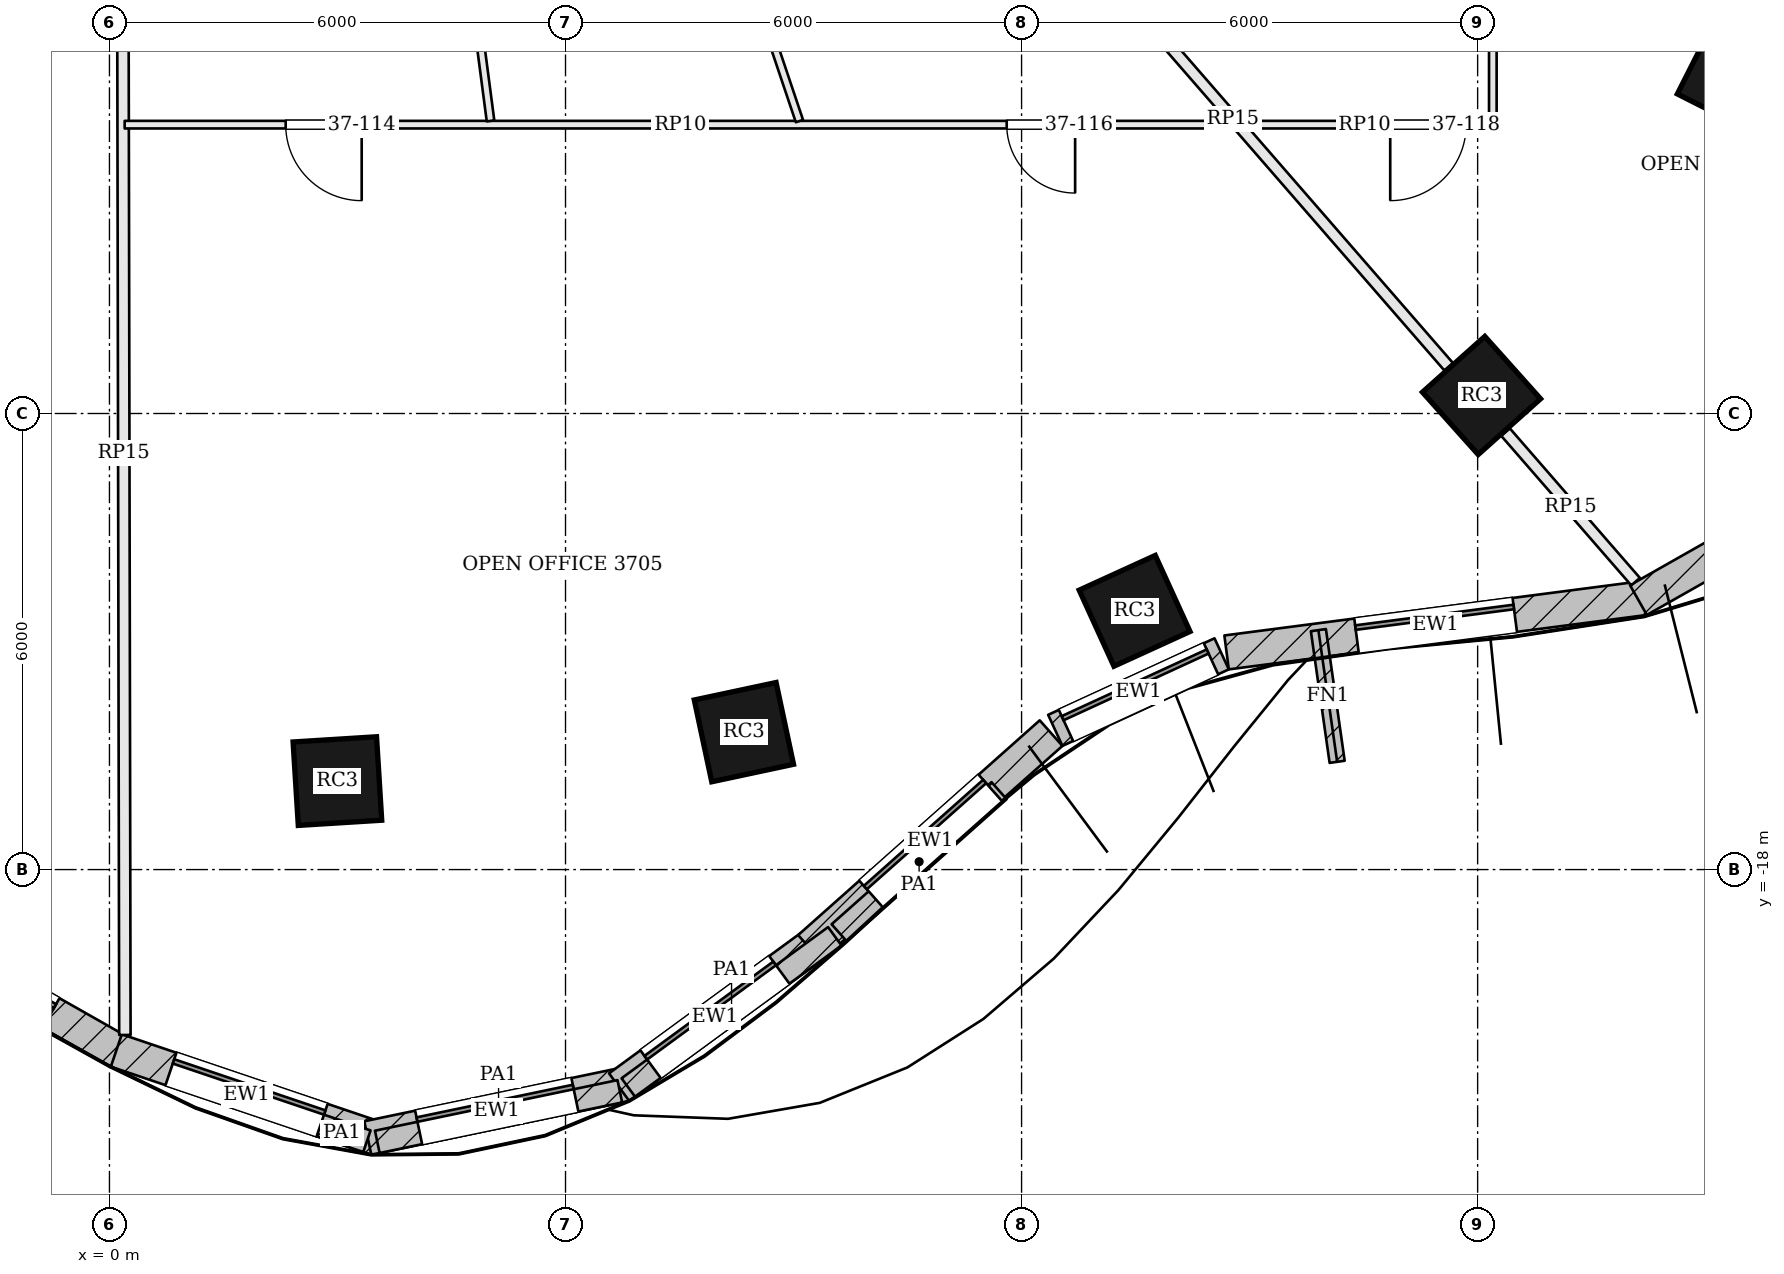
"""IFC4 building model, lengths in metres.
Left out: names, types, materials, properties, quantities, classifications, styles, units other than length and angle.
Written with IfcOpenShell. Run it as: python <this file> out.ifc"""

import sys

from ifc_helpers import new_model, si_unit, direction, frame, frame_2d, origin, origin_2d, place, context, subcontext, project, spatial, rectangle, extrude, element, fill, save


model = new_model("IFC4")
c1 = context("Model", 3, precision=1e-05, world=origin(), true_north=direction((0.0, 1.0)))
c2 = subcontext(c1, "Body", "Model", "MODEL_VIEW")
j1 = project(units=[si_unit("LENGTHUNIT", "METRE"), si_unit("PLANEANGLEUNIT", "RADIAN")], contexts=[c1])
p1 = place(None, origin())
s1 = spatial("IfcSite", under=j1, at=p1, CompositionType="ELEMENT")
p2 = place(p1, origin())
s2 = spatial("IfcBuilding", under=s1, at=p2, CompositionType="ELEMENT")
p3 = place(p2, frame((0.0, 0.0, 153.9)))
s3 = spatial("IfcBuildingStorey", under=s2, at=p3, CompositionType="ELEMENT", Elevation=153.9)
for number, where, z_axis, x_axis in (
    (1, (2.999, -16.836, 0.0), (0.0, 0.0, 1.0), (0.998, 0.062, 0.0)),
    (2, (8.347, -16.192, 0.0), (0.0, 0.0, 1.0), (0.978, 0.209, 0.0)),
    (3, (13.487, -14.596, 0.0), (0.0, 0.0, 1.0), (0.91, 0.415, 0.0)),
    (4, (18.051, -11.763, 0.0), (0.0, 0.0, 1.0), (0.746, 0.666, 0.0)),
    (5, (21.367, -7.554, 0.0), (0.0, 0.0, 1.0), (0.452, 0.892, 0.0)),
):
    element("IfcColumn", number, at=place(p3, frame(where, z_axis=z_axis, x_axis=x_axis)), inside=s3, PredefinedType="COLUMN", context=c2, shape_type="SweptSolid", body=[
        extrude(rectangle(XDim=1.1, YDim=1.1, at=origin_2d()), origin(), (0.0, 0.0, 1.0), 3.9),
    ])
p4 = place(p3, frame((-3.493, -18.343, 0.0), z_axis=(0.0, 0.0, 1.0), x_axis=(0.869825988853, -0.493358641473, 0.0)))
e6 = element("IfcWall", 6, at=p4, inside=s3, PredefinedType="SOLIDWALL", context=c2, shape_type="SweptSolid", body=[
    extrude(rectangle(XDim=4.165, YDim=0.45, at=frame_2d((2.083, 0.0))), origin(), (0.0, 0.0, 1.0), 3.7),
])
p5 = place(p4, frame((1.032, 0.0, 0.9)))
e7 = element("IfcOpeningElement", 7, at=p5, cuts=e6, PredefinedType="OPENING", context=c2, shape_type="SweptSolid", body=[
    extrude(rectangle(XDim=2.1, YDim=2.3, at=frame_2d((1.05, 1.15))), frame((0.0, 0.235, 0.0), z_axis=(0.0, -1.0, 0.0), x_axis=(1.0, 0.0, 0.0)), (0.0, 0.0, 1.0), 0.47),
])
p6 = place(p3, frame((0.091, -20.38, 0.0), z_axis=(0.0, 0.0, 1.0), x_axis=(0.947304227221, -0.320335294791, 0.0)))
e8 = element("IfcWall", 8, at=p6, inside=s3, PredefinedType="SOLIDWALL", context=c2, shape_type="SweptSolid", body=[
    extrude(rectangle(XDim=3.617, YDim=0.45, at=frame_2d((1.809, 0.0))), origin(), (0.0, 0.0, 1.0), 3.7),
])
p7 = place(p6, frame((0.759, 0.0, 0.9)))
e9 = element("IfcOpeningElement", 9, at=p7, cuts=e8, PredefinedType="OPENING", context=c2, shape_type="SweptSolid", body=[
    extrude(rectangle(XDim=2.1, YDim=2.3, at=frame_2d((1.05, 1.15))), frame((0.0, 0.235, 0.0), z_axis=(0.0, -1.0, 0.0), x_axis=(1.0, 0.0, 0.0)), (0.0, 0.0, 1.0), 0.47),
])
p8 = place(p3, frame((3.399, -21.532, 0.0), z_axis=(0.0, 0.0, 1.0), x_axis=(0.978915912181, 0.204263645512, 0.0)))
e10 = element("IfcWall", 10, at=p8, inside=s3, PredefinedType="SOLIDWALL", context=c2, shape_type="SweptSolid", body=[
    extrude(rectangle(XDim=3.466, YDim=0.45, at=frame_2d((1.733, 0.0))), origin(), (0.0, 0.0, 1.0), 3.7),
])
p9 = place(p8, frame((0.683, 0.0, 0.9)))
e11 = element("IfcOpeningElement", 11, at=p9, cuts=e10, PredefinedType="OPENING", context=c2, shape_type="SweptSolid", body=[
    extrude(rectangle(XDim=2.1, YDim=2.3, at=frame_2d((1.05, 1.15))), frame((0.0, 0.235, 0.0), z_axis=(0.0, -1.0, 0.0), x_axis=(1.0, 0.0, 0.0)), (0.0, 0.0, 1.0), 0.47),
])
p10 = place(p3, frame((6.705, -20.862, 0.0), z_axis=(0.0, 0.0, 1.0), x_axis=(0.806921336267, 0.590658917716, 0.0)))
e12 = element("IfcWall", 12, at=p10, inside=s3, PredefinedType="SOLIDWALL", context=c2, shape_type="SweptSolid", body=[
    extrude(rectangle(XDim=3.125, YDim=0.45, at=frame_2d((1.562, 0.0))), origin(), (0.0, 0.0, 1.0), 3.7),
])
p11 = place(p10, frame((0.512, 0.0, 0.9)))
e13 = element("IfcOpeningElement", 13, at=p11, cuts=e12, PredefinedType="OPENING", context=c2, shape_type="SweptSolid", body=[
    extrude(rectangle(XDim=2.1, YDim=2.3, at=frame_2d((1.05, 1.15))), frame((0.0, 0.235, 0.0), z_axis=(0.0, -1.0, 0.0), x_axis=(1.0, 0.0, 0.0)), (0.0, 0.0, 1.0), 0.47),
])
p12 = place(p3, frame((9.21, -19.03, 0.0), z_axis=(0.0, 0.0, 1.0), x_axis=(0.747396648191, 0.664378092861, 0.0)))
e14 = element("IfcWall", 14, at=p12, inside=s3, PredefinedType="SOLIDWALL", context=c2, shape_type="SweptSolid", body=[
    extrude(rectangle(XDim=4.252, YDim=0.45, at=frame_2d((2.126, 0.0))), origin(), (0.0, 0.0, 1.0), 3.7),
])
p13 = place(p12, frame((1.076, 0.0, 0.9)))
e15 = element("IfcOpeningElement", 15, at=p13, cuts=e14, PredefinedType="OPENING", context=c2, shape_type="SweptSolid", body=[
    extrude(rectangle(XDim=2.1, YDim=2.3, at=frame_2d((1.05, 1.15))), frame((0.0, 0.235, 0.0), z_axis=(0.0, -1.0, 0.0), x_axis=(1.0, 0.0, 0.0)), (0.0, 0.0, 1.0), 0.47),
])
p14 = place(p3, frame((12.444, -16.169, 0.0), z_axis=(0.0, 0.0, 1.0), x_axis=(0.908468904074, 0.417952449844, 0.0)))
e16 = element("IfcWall", 16, at=p14, inside=s3, PredefinedType="SOLIDWALL", context=c2, shape_type="SweptSolid", body=[
    extrude(rectangle(XDim=2.409, YDim=0.45, at=frame_2d((1.205, 0.0))), origin(), (0.0, 0.0, 1.0), 3.7),
])
p15 = place(p14, frame((0.155, 0.0, 0.9)))
e17 = element("IfcOpeningElement", 17, at=p15, cuts=e16, PredefinedType="OPENING", context=c2, shape_type="SweptSolid", body=[
    extrude(rectangle(XDim=2.1, YDim=2.3, at=frame_2d((1.05, 1.15))), frame((0.0, 0.235, 0.0), z_axis=(0.0, -1.0, 0.0), x_axis=(1.0, 0.0, 0.0)), (0.0, 0.0, 1.0), 0.47),
])
p16 = place(p3, frame((14.697, -15.143, 0.0), z_axis=(0.0, 0.0, 1.0), x_axis=(0.991631798411, 0.129098320597, 0.0)))
e18 = element("IfcWall", 18, at=p16, inside=s3, PredefinedType="SOLIDWALL", context=c2, shape_type="SweptSolid", body=[
    extrude(rectangle(XDim=5.547, YDim=0.45, at=frame_2d((2.773, 0.0))), origin(), (0.0, 0.0, 1.0), 3.7),
])
p17 = place(p16, frame((1.723, 0.0, 0.9)))
e19 = element("IfcOpeningElement", 19, at=p17, cuts=e18, PredefinedType="OPENING", context=c2, shape_type="SweptSolid", body=[
    extrude(rectangle(XDim=2.1, YDim=2.3, at=frame_2d((1.05, 1.15))), frame((0.0, 0.235, 0.0), z_axis=(0.0, -1.0, 0.0), x_axis=(1.0, 0.0, 0.0)), (0.0, 0.0, 1.0), 0.47),
])
p18 = place(p3, frame((20.115, -14.455, 0.0), z_axis=(0.0, 0.0, 1.0), x_axis=(0.869822679286, 0.493364476427, 0.0)))
e20 = element("IfcWall", 20, at=p18, inside=s3, PredefinedType="SOLIDWALL", context=c2, shape_type="SweptSolid", body=[
    extrude(rectangle(XDim=4.638, YDim=0.45, at=frame_2d((2.319, 0.0))), origin(), (0.0, 0.0, 1.0), 3.7),
])
p19 = place(p18, frame((1.269, 0.0, 0.9)))
e21 = element("IfcOpeningElement", 21, at=p19, cuts=e20, PredefinedType="OPENING", context=c2, shape_type="SweptSolid", body=[
    extrude(rectangle(XDim=2.1, YDim=2.3, at=frame_2d((1.05, 1.15))), frame((0.0, 0.235, 0.0), z_axis=(0.0, -1.0, 0.0), x_axis=(1.0, 0.0, 0.0)), (0.0, 0.0, 1.0), 0.47),
])
p20 = place(p3, frame((15.905, -14.85, 0.0), z_axis=(0.0, 0.0, 1.0), x_axis=(0.140913490987, -0.990021912918, 0.0)))
e22 = element("IfcWall", 22, at=p20, inside=s3, PredefinedType="SOLIDWALL", context=c2, shape_type="SweptSolid", body=[
    extrude(rectangle(XDim=1.75, YDim=0.2, at=frame_2d((0.875, 0.0))), origin(), (0.0, 0.0, 1.0), 3.7),
])
p21 = place(p3, frame((2.729, -21.352, 3.9), z_axis=(0.0, 0.0, 1.0), x_axis=(0.947268485621, -0.320440971397, 0.0)))
e23 = element("IfcWall", 23, at=p21, inside=s3, PredefinedType="PARAPET", context=c2, shape_type="SweptSolid", body=[
    extrude(rectangle(XDim=0.695, YDim=0.3, at=frame_2d((0.347, 0.0))), origin(), (0.0, 0.0, 1.0), 1.1),
])
p22 = place(p3, frame((3.524, -21.582, 3.9), z_axis=(0.0, 0.0, 1.0), x_axis=(0.97891618591, 0.204262333689, 0.0)))
e24 = element("IfcWall", 24, at=p22, inside=s3, PredefinedType="PARAPET", context=c2, shape_type="SweptSolid", body=[
    extrude(rectangle(XDim=3.259, YDim=0.3, at=frame_2d((1.63, 0.0))), origin(), (0.0, 0.0, 1.0), 1.1),
])
p23 = place(p3, frame((6.826, -20.867, 3.9), z_axis=(0.0, 0.0, 1.0), x_axis=(0.806907255022, 0.590678154152, 0.0)))
e25 = element("IfcWall", 25, at=p23, inside=s3, PredefinedType="PARAPET", context=c2, shape_type="SweptSolid", body=[
    extrude(rectangle(XDim=3.367, YDim=0.3, at=frame_2d((1.684, 0.0))), origin(), (0.0, 0.0, 1.0), 1.1),
])
p24 = place(p3, frame((9.6, -18.832, 3.9), z_axis=(0.0, 0.0, 1.0), x_axis=(0.747433246304, 0.664336919281, 0.0)))
e26 = element("IfcWall", 26, at=p24, inside=s3, PredefinedType="PARAPET", context=c2, shape_type="SweptSolid", body=[
    extrude(rectangle(XDim=2.815, YDim=0.3, at=frame_2d((1.407, 0.0))), origin(), (0.0, 0.0, 1.0), 1.1),
])
p25 = place(p3, frame((0.203, -20.176, 0.0), z_axis=(0.0, 0.0, 1.0), x_axis=(-0.001930652346, 0.999998136289, 0.0)))
e27 = element("IfcWall", 27, at=p25, inside=s3, PredefinedType="PARTITIONING", context=c2, shape_type="SweptSolid", body=[
    extrude(rectangle(XDim=15.301, YDim=0.15, at=frame_2d((7.65, 0.0))), origin(), (0.0, 0.0, 1.0), 3.198),
])
p26 = place(p3, frame((20.078, -14.212, 0.0), z_axis=(0.0, 0.0, 1.0), x_axis=(-0.656227405116, 0.754563180108, 0.0)))
e28 = element("IfcWall", 28, at=p26, inside=s3, PredefinedType="PARTITIONING", context=c2, shape_type="SweptSolid", body=[
    extrude(rectangle(XDim=2.607, YDim=0.15, at=frame_2d((1.303, 0.0))), origin(), (0.0, 0.0, 1.0), 3.198),
])
p27 = place(p3, frame((17.619, -11.385, 0.0), z_axis=(0.0, 0.0, 1.0), x_axis=(-0.656270229344, 0.754525934662, 0.0)))
e29 = element("IfcWall", 29, at=p27, inside=s3, PredefinedType="PARTITIONING", context=c2, shape_type="SweptSolid", body=[
    extrude(rectangle(XDim=8.652, YDim=0.15, at=frame_2d((4.326, 0.0))), origin(), (0.0, 0.0, 1.0), 3.198),
])
p28 = place(p3, frame((14.823, -8.2, 0.0), z_axis=(0.0, 0.0, 1.0), x_axis=(-1.0, 0.0, 0.0)))
e30 = element("IfcWall", 30, at=p28, inside=s3, PredefinedType="PARTITIONING", context=c2, shape_type="SweptSolid", body=[
    extrude(rectangle(XDim=14.622, YDim=0.1, at=frame_2d((7.311, 0.0))), origin(), (0.0, 0.0, 1.0), 3.184),
])
p29 = place(p28, frame((11.504, 0.0, 0.0)))
e31 = element("IfcOpeningElement", 31, at=p29, cuts=e30, PredefinedType="OPENING", context=c2, shape_type="SweptSolid", body=[
    extrude(rectangle(XDim=1.0, YDim=2.1, at=frame_2d((0.5, 1.05))), frame((0.0, 0.06, 0.0), z_axis=(0.0, -1.0, 0.0), x_axis=(1.0, 0.0, 0.0)), (0.0, 0.0, 1.0), 0.12),
])
p30 = place(p28, frame((2.118, 0.0, 0.0)))
e32 = element("IfcOpeningElement", 32, at=p30, cuts=e30, PredefinedType="OPENING", context=c2, shape_type="SweptSolid", body=[
    extrude(rectangle(XDim=0.9, YDim=2.1, at=frame_2d((0.45, 1.05))), frame((0.0, 0.06, 0.0), z_axis=(0.0, -1.0, 0.0), x_axis=(1.0, 0.0, 0.0)), (0.0, 0.0, 1.0), 0.12),
])
p31 = place(p3, frame((4.583, -4.875, 0.0), z_axis=(0.0, 0.0, 1.0), x_axis=(0.130125733959, -0.991497500431, 0.0)))
e33 = element("IfcWall", 33, at=p31, inside=s3, PredefinedType="PARTITIONING", context=c2, shape_type="SweptSolid", body=[
    extrude(rectangle(XDim=3.304, YDim=0.1, at=frame_2d((1.652, 0.0))), origin(), (0.0, 0.0, 1.0), 3.184),
])
p32 = place(p3, frame((7.974, -4.871, 0.0), z_axis=(0.0, 0.0, 1.0), x_axis=(0.318807519281, -0.947819479463, 0.0)))
e34 = element("IfcWall", 34, at=p32, inside=s3, PredefinedType="PARTITIONING", context=c2, shape_type="SweptSolid", body=[
    extrude(rectangle(XDim=3.462, YDim=0.1, at=frame_2d((1.731, 0.0))), origin(), (0.0, 0.0, 1.0), 3.184),
])
p33 = place(p3, frame((18.2, 2.915, 0.0), z_axis=(0.0, 0.0, 1.0), x_axis=(0.0, -1.0, 0.0)))
e35 = element("IfcWall", 35, at=p33, inside=s3, PredefinedType="PARTITIONING", context=c2, shape_type="SweptSolid", body=[
    extrude(rectangle(XDim=11.115, YDim=0.1, at=frame_2d((5.558, 0.0))), origin(), (0.0, 0.0, 1.0), 3.184),
])
p34 = place(p33, frame((1.017, 0.0, 0.0)))
e36 = element("IfcOpeningElement", 36, at=p34, cuts=e35, PredefinedType="OPENING", context=c2, shape_type="SweptSolid", body=[
    extrude(rectangle(XDim=0.9, YDim=2.1, at=frame_2d((0.45, 1.05))), frame((0.0, 0.06, 0.0), z_axis=(0.0, -1.0, 0.0), x_axis=(1.0, 0.0, 0.0)), (0.0, 0.0, 1.0), 0.12),
])
p35 = place(p3, frame((18.15, -8.2, 0.0), z_axis=(0.0, 0.0, 1.0), x_axis=(-1.0, 0.0, 0.0)))
e37 = element("IfcWall", 37, at=p35, inside=s3, PredefinedType="PARTITIONING", context=c2, shape_type="SweptSolid", body=[
    extrude(rectangle(XDim=3.274, YDim=0.1, at=frame_2d((1.637, 0.0))), origin(), (0.0, 0.0, 1.0), 3.184),
])
p36 = place(p35, frame((0.3, 0.0, 0.0)))
e38 = element("IfcOpeningElement", 38, at=p36, cuts=e37, PredefinedType="OPENING", context=c2, shape_type="SweptSolid", body=[
    extrude(rectangle(XDim=1.0, YDim=2.1, at=frame_2d((0.5, 1.05))), frame((0.0, 0.06, 0.0), z_axis=(0.0, -1.0, 0.0), x_axis=(1.0, 0.0, 0.0)), (0.0, 0.0, 1.0), 0.12),
])
p37 = place(p5, origin())
e39 = element("IfcWindow", 39, at=p37, inside=s3, PartitioningType="SINGLE_PANEL", PredefinedType="WINDOW", context=c2, shape_type="SweptSolid", body=[
    extrude(rectangle(XDim=2.1, YDim=2.3, at=frame_2d((1.05, 1.15))), frame((0.0, 0.135, 0.0), z_axis=(0.0, -1.0, 0.0), x_axis=(1.0, 0.0, 0.0)), (0.0, 0.0, 1.0), 0.06),
])
fill(e7, e39)
p38 = place(p7, origin())
e40 = element("IfcWindow", 40, at=p38, inside=s3, PartitioningType="SINGLE_PANEL", PredefinedType="WINDOW", context=c2, shape_type="SweptSolid", body=[
    extrude(rectangle(XDim=2.1, YDim=2.3, at=frame_2d((1.05, 1.15))), frame((0.0, 0.135, 0.0), z_axis=(0.0, -1.0, 0.0), x_axis=(1.0, 0.0, 0.0)), (0.0, 0.0, 1.0), 0.06),
])
fill(e9, e40)
p39 = place(p9, origin())
e41 = element("IfcWindow", 41, at=p39, inside=s3, PartitioningType="SINGLE_PANEL", PredefinedType="WINDOW", context=c2, shape_type="SweptSolid", body=[
    extrude(rectangle(XDim=2.1, YDim=2.3, at=frame_2d((1.05, 1.15))), frame((0.0, 0.135, 0.0), z_axis=(0.0, -1.0, 0.0), x_axis=(1.0, 0.0, 0.0)), (0.0, 0.0, 1.0), 0.06),
])
fill(e11, e41)
p40 = place(p11, origin())
e42 = element("IfcWindow", 42, at=p40, inside=s3, PartitioningType="SINGLE_PANEL", PredefinedType="WINDOW", context=c2, shape_type="SweptSolid", body=[
    extrude(rectangle(XDim=2.1, YDim=2.3, at=frame_2d((1.05, 1.15))), frame((0.0, 0.135, 0.0), z_axis=(0.0, -1.0, 0.0), x_axis=(1.0, 0.0, 0.0)), (0.0, 0.0, 1.0), 0.06),
])
fill(e13, e42)
p41 = place(p13, origin())
e43 = element("IfcWindow", 43, at=p41, inside=s3, PartitioningType="SINGLE_PANEL", PredefinedType="WINDOW", context=c2, shape_type="SweptSolid", body=[
    extrude(rectangle(XDim=2.1, YDim=2.3, at=frame_2d((1.05, 1.15))), frame((0.0, 0.135, 0.0), z_axis=(0.0, -1.0, 0.0), x_axis=(1.0, 0.0, 0.0)), (0.0, 0.0, 1.0), 0.06),
])
fill(e15, e43)
p42 = place(p15, origin())
e44 = element("IfcWindow", 44, at=p42, inside=s3, PartitioningType="SINGLE_PANEL", PredefinedType="WINDOW", context=c2, shape_type="SweptSolid", body=[
    extrude(rectangle(XDim=2.1, YDim=2.3, at=frame_2d((1.05, 1.15))), frame((0.0, 0.135, 0.0), z_axis=(0.0, -1.0, 0.0), x_axis=(1.0, 0.0, 0.0)), (0.0, 0.0, 1.0), 0.06),
])
fill(e17, e44)
p43 = place(p17, origin())
e45 = element("IfcWindow", 45, at=p43, inside=s3, PartitioningType="SINGLE_PANEL", PredefinedType="WINDOW", context=c2, shape_type="SweptSolid", body=[
    extrude(rectangle(XDim=2.1, YDim=2.3, at=frame_2d((1.05, 1.15))), frame((0.0, 0.135, 0.0), z_axis=(0.0, -1.0, 0.0), x_axis=(1.0, 0.0, 0.0)), (0.0, 0.0, 1.0), 0.06),
])
fill(e19, e45)
p44 = place(p29, origin())
e46 = element("IfcDoor", 46, at=p44, inside=s3, OperationType="SINGLE_SWING_LEFT", PredefinedType="DOOR", context=c2, shape_type="SweptSolid", body=[
    extrude(rectangle(XDim=1.0, YDim=2.1, at=frame_2d((0.5, 1.05))), frame((0.0, 0.025, 0.0), z_axis=(0.0, -1.0, 0.0), x_axis=(1.0, 0.0, 0.0)), (0.0, 0.0, 1.0), 0.05),
])
fill(e31, e46)
p45 = place(p30, origin())
e47 = element("IfcDoor", 47, at=p45, inside=s3, OperationType="SINGLE_SWING_LEFT", PredefinedType="DOOR", context=c2, shape_type="SweptSolid", body=[
    extrude(rectangle(XDim=0.9, YDim=2.1, at=frame_2d((0.45, 1.05))), frame((0.0, 0.025, 0.0), z_axis=(0.0, -1.0, 0.0), x_axis=(1.0, 0.0, 0.0)), (0.0, 0.0, 1.0), 0.05),
])
fill(e32, e47)
p46 = place(p36, origin())
e48 = element("IfcDoor", 48, at=p46, inside=s3, OperationType="SINGLE_SWING_RIGHT", PredefinedType="DOOR", context=c2, shape_type="SweptSolid", body=[
    extrude(rectangle(XDim=1.0, YDim=2.1, at=frame_2d((0.5, 1.05))), frame((0.0, 0.025, 0.0), z_axis=(0.0, -1.0, 0.0), x_axis=(1.0, 0.0, 0.0)), (0.0, 0.0, 1.0), 0.05),
])
fill(e38, e48)
save(model, sys.argv[1])
